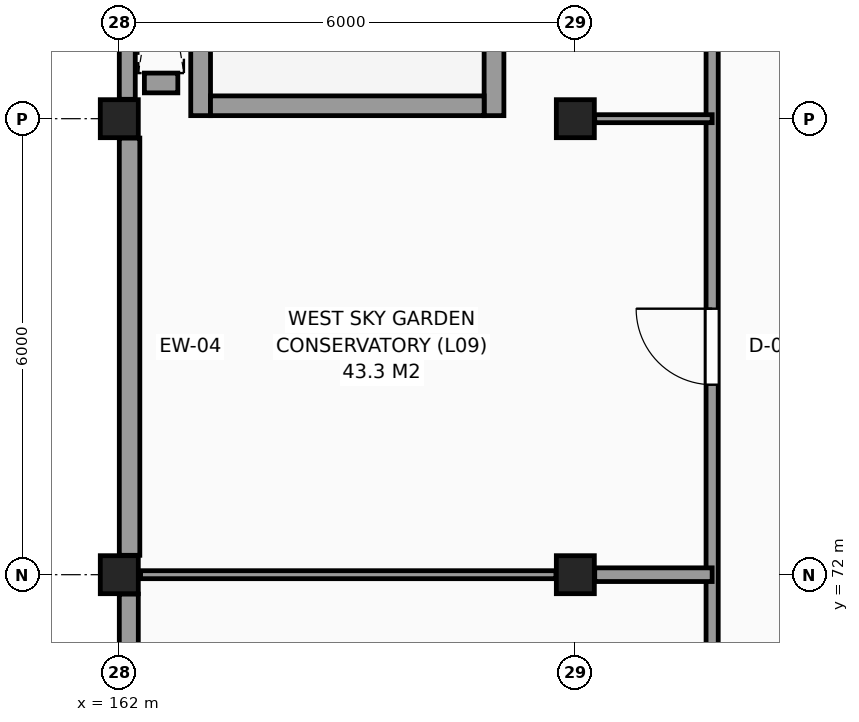
"""IFC4 building model, lengths in metres.
Left out: names, types, materials, properties, quantities, classifications, styles, units other than length and angle.
Written with IfcOpenShell. Run it as: python <this file> out.ifc"""

import sys

from ifc_helpers import new_model, si_unit, direction, frame, frame_2d, origin, origin_2d, place, context, subcontext, project, spatial, rectangle, extrude, element, fill, save


model = new_model("IFC4")
c1 = context("Model", 3, precision=1e-05, world=origin(), true_north=direction((0.0, 1.0)))
c2 = subcontext(c1, "Body", "Model", "MODEL_VIEW")
j1 = project(units=[si_unit("LENGTHUNIT", "METRE"), si_unit("PLANEANGLEUNIT", "RADIAN")], contexts=[c1])
p1 = place(None, origin())
s1 = spatial("IfcSite", under=j1, at=p1, CompositionType="ELEMENT")
p2 = place(p1, origin())
s2 = spatial("IfcBuilding", under=s1, at=p2, CompositionType="ELEMENT")
p3 = place(p2, frame((0.0, 0.0, 38.1)))
s3 = spatial("IfcBuildingStorey", under=s2, at=p3, CompositionType="ELEMENT", Elevation=38.1)
for number, where, z_axis, x_axis in (
    (1, (162.0, 72.0, 0.0), (0.0, 0.0, 1.0), (1.0, 0.0, 0.0)),
    (2, (162.0, 78.0, 0.0), (0.0, 0.0, 1.0), (1.0, 0.0, 0.0)),
    (3, (168.0, 72.0, 0.0), (0.0, 0.0, 1.0), (1.0, 0.0, 0.0)),
    (4, (168.0, 78.0, 0.0), (0.0, 0.0, 1.0), (1.0, 0.0, 0.0)),
):
    element("IfcColumn", number, at=place(p3, frame(where, z_axis=z_axis, x_axis=x_axis)), inside=s3, PredefinedType="COLUMN", context=c2, shape_type="SweptSolid", body=[
        extrude(rectangle(XDim=0.5, YDim=0.5, at=origin_2d()), origin(), (0.0, 0.0, 1.0), 3.3),
    ])
p4 = place(p3, frame((162.105, 83.745, 0.0), z_axis=(0.0, 0.0, 1.0), x_axis=(0.0, -1.0, 0.0)))
e5 = element("IfcWall", 5, at=p4, inside=s3, PredefinedType="SOLIDWALL", context=c2, shape_type="SweptSolid", body=[
    extrude(rectangle(XDim=5.49, YDim=0.21, at=frame_2d((2.745, 0.0))), origin(), (0.0, 0.0, 1.0), 3.06),
])
p5 = place(p3, frame((162.135, 77.745, 0.0), z_axis=(0.0, 0.0, 1.0), x_axis=(0.0, -1.0, 0.0)))
e6 = element("IfcWall", 6, at=p5, inside=s3, PredefinedType="SOLIDWALL", context=c2, shape_type="SweptSolid", body=[
    extrude(rectangle(XDim=5.49, YDim=0.27, at=frame_2d((2.745, 0.0))), origin(), (0.0, 0.0, 1.0), 2.41),
])
p6 = place(p3, frame((162.125, 71.745, 0.0), z_axis=(0.0, 0.0, 1.0), x_axis=(0.0, -1.0, 0.0)))
e7 = element("IfcWall", 7, at=p6, inside=s3, PredefinedType="SOLIDWALL", context=c2, shape_type="SweptSolid", body=[
    extrude(rectangle(XDim=5.49, YDim=0.25, at=frame_2d((2.745, 0.0))), origin(), (0.0, 0.0, 1.0), 2.41),
])
p7 = place(p6, frame((2.045, 0.0, 0.8)))
e8 = element("IfcOpeningElement", 8, at=p7, cuts=e7, PredefinedType="OPENING", context=c2, shape_type="SweptSolid", body=[
    extrude(rectangle(XDim=1.4, YDim=1.4, at=frame_2d((0.7, 0.7))), frame((0.0, 0.135, 0.0), z_axis=(0.0, -1.0, 0.0), x_axis=(1.0, 0.0, 0.0)), (0.0, 0.0, 1.0), 0.27),
])
for number, where, z_axis, x_axis in (
    (9, (163.07, 78.04, 0.0), (0.0, 0.0, 1.0), (0.0, 1.0, 0.0)),
    (10, (166.93, 78.04, 0.0), (0.0, 0.0, 1.0), (0.0, 1.0, 0.0)),
):
    element("IfcWall", number, at=place(p3, frame(where, z_axis=z_axis, x_axis=x_axis)), inside=s3, PredefinedType="SHEAR", context=c2, shape_type="SweptSolid", body=[
        extrude(rectangle(XDim=10.72, YDim=0.26, at=frame_2d((5.36, 0.0))), origin(), (0.0, 0.0, 1.0), 3.3),
    ])
p8 = place(p3, frame((163.2, 78.17, 0.0), z_axis=(0.0, 0.0, 1.0), x_axis=(1.0, 0.0, 0.0)))
e11 = element("IfcWall", 11, at=p8, inside=s3, PredefinedType="SHEAR", context=c2, shape_type="SweptSolid", body=[
    extrude(rectangle(XDim=3.6, YDim=0.26, at=frame_2d((1.8, 0.0))), origin(), (0.0, 0.0, 1.0), 3.3),
])
p9 = place(p3, frame((162.33, 78.47, 0.0), z_axis=(0.0, 0.0, 1.0), x_axis=(1.0, 0.0, 0.0)))
e12 = element("IfcWall", 12, at=p9, inside=s3, PredefinedType="SHEAR", context=c2, shape_type="SweptSolid", body=[
    extrude(rectangle(XDim=0.44, YDim=0.26, at=frame_2d((0.22, 0.0))), origin(), (0.0, 0.0, 1.0), 3.3),
])
p10 = place(p3, frame((169.8, 42.215, 0.0), z_axis=(0.0, 0.0, 1.0), x_axis=(0.0, 1.0, 0.0)))
e13 = element("IfcWall", 13, at=p10, inside=s3, PredefinedType="PARTITIONING", context=c2, shape_type="SweptSolid", body=[
    extrude(rectangle(XDim=65.605, YDim=0.16, at=frame_2d((32.802, 0.0))), origin(), (0.0, 0.0, 1.0), 3.06),
])
p11 = place(p10, frame((50.185, 0.0, 0.0)))
e14 = element("IfcOpeningElement", 14, at=p11, cuts=e13, PredefinedType="OPENING", context=c2, shape_type="SweptSolid", body=[
    extrude(rectangle(XDim=1.2, YDim=2.2, at=frame_2d((0.6, 1.1))), frame((0.0, 0.09, 0.0), z_axis=(0.0, -1.0, 0.0), x_axis=(1.0, 0.0, 0.0)), (0.0, 0.0, 1.0), 0.18),
])
p12 = place(p10, frame((32.285, 0.0, 0.0)))
e15 = element("IfcOpeningElement", 15, at=p12, cuts=e13, PredefinedType="OPENING", context=c2, shape_type="SweptSolid", body=[
    extrude(rectangle(XDim=1.0, YDim=2.15, at=frame_2d((0.5, 1.075))), frame((0.0, 0.09, 0.0), z_axis=(0.0, -1.0, 0.0), x_axis=(1.0, 0.0, 0.0)), (0.0, 0.0, 1.0), 0.18),
])
p13 = place(p10, frame((0.46, 0.0, 0.0)))
e16 = element("IfcOpeningElement", 16, at=p13, cuts=e13, PredefinedType="OPENING", context=c2, shape_type="SweptSolid", body=[
    extrude(rectangle(XDim=0.95, YDim=2.1, at=frame_2d((0.475, 1.05))), frame((0.0, 0.09, 0.0), z_axis=(0.0, -1.0, 0.0), x_axis=(1.0, 0.0, 0.0)), (0.0, 0.0, 1.0), 0.18),
])
p14 = place(p10, frame((6.51, 0.0, 0.0)))
e17 = element("IfcOpeningElement", 17, at=p14, cuts=e13, PredefinedType="OPENING", context=c2, shape_type="SweptSolid", body=[
    extrude(rectangle(XDim=0.95, YDim=2.1, at=frame_2d((0.475, 1.05))), frame((0.0, 0.09, 0.0), z_axis=(0.0, -1.0, 0.0), x_axis=(1.0, 0.0, 0.0)), (0.0, 0.0, 1.0), 0.18),
])
p15 = place(p10, frame((12.51, 0.0, 0.0)))
e18 = element("IfcOpeningElement", 18, at=p15, cuts=e13, PredefinedType="OPENING", context=c2, shape_type="SweptSolid", body=[
    extrude(rectangle(XDim=0.95, YDim=2.1, at=frame_2d((0.475, 1.05))), frame((0.0, 0.09, 0.0), z_axis=(0.0, -1.0, 0.0), x_axis=(1.0, 0.0, 0.0)), (0.0, 0.0, 1.0), 0.18),
])
p16 = place(p10, frame((18.51, 0.0, 0.0)))
e19 = element("IfcOpeningElement", 19, at=p16, cuts=e13, PredefinedType="OPENING", context=c2, shape_type="SweptSolid", body=[
    extrude(rectangle(XDim=0.95, YDim=2.1, at=frame_2d((0.475, 1.05))), frame((0.0, 0.09, 0.0), z_axis=(0.0, -1.0, 0.0), x_axis=(1.0, 0.0, 0.0)), (0.0, 0.0, 1.0), 0.18),
])
p17 = place(p10, frame((24.51, 0.0, 0.0)))
e20 = element("IfcOpeningElement", 20, at=p17, cuts=e13, PredefinedType="OPENING", context=c2, shape_type="SweptSolid", body=[
    extrude(rectangle(XDim=0.95, YDim=2.1, at=frame_2d((0.475, 1.05))), frame((0.0, 0.09, 0.0), z_axis=(0.0, -1.0, 0.0), x_axis=(1.0, 0.0, 0.0)), (0.0, 0.0, 1.0), 0.18),
])
p18 = place(p10, frame((54.51, 0.0, 0.0)))
e21 = element("IfcOpeningElement", 21, at=p18, cuts=e13, PredefinedType="OPENING", context=c2, shape_type="SweptSolid", body=[
    extrude(rectangle(XDim=0.95, YDim=2.1, at=frame_2d((0.475, 1.05))), frame((0.0, 0.09, 0.0), z_axis=(0.0, -1.0, 0.0), x_axis=(1.0, 0.0, 0.0)), (0.0, 0.0, 1.0), 0.18),
])
p19 = place(p10, frame((60.51, 0.0, 0.0)))
e22 = element("IfcOpeningElement", 22, at=p19, cuts=e13, PredefinedType="OPENING", context=c2, shape_type="SweptSolid", body=[
    extrude(rectangle(XDim=0.95, YDim=2.1, at=frame_2d((0.475, 1.05))), frame((0.0, 0.09, 0.0), z_axis=(0.0, -1.0, 0.0), x_axis=(1.0, 0.0, 0.0)), (0.0, 0.0, 1.0), 0.18),
])
p20 = place(p3, frame((162.28, 72.0, 0.0), z_axis=(0.0, 0.0, 1.0), x_axis=(1.0, 0.0, 0.0)))
e23 = element("IfcWall", 23, at=p20, inside=s3, PredefinedType="PARTITIONING", context=c2, shape_type="SweptSolid", body=[
    extrude(rectangle(XDim=5.465, YDim=0.105, at=frame_2d((2.732, 0.0))), origin(), (0.0, 0.0, 1.0), 2.26),
])
p21 = place(p3, frame((168.255, 72.0, 0.0), z_axis=(0.0, 0.0, 1.0), x_axis=(1.0, 0.0, 0.0)))
e24 = element("IfcWall", 24, at=p21, inside=s3, PredefinedType="PARTITIONING", context=c2, shape_type="SweptSolid", body=[
    extrude(rectangle(XDim=1.545, YDim=0.18, at=frame_2d((0.772, 0.0))), origin(), (0.0, 0.0, 1.0), 2.26),
])
p22 = place(p3, frame((168.255, 78.0, 0.0), z_axis=(0.0, 0.0, 1.0), x_axis=(1.0, 0.0, 0.0)))
e25 = element("IfcWall", 25, at=p22, inside=s3, PredefinedType="PARTITIONING", context=c2, shape_type="SweptSolid", body=[
    extrude(rectangle(XDim=1.545, YDim=0.105, at=frame_2d((0.772, 0.0))), origin(), (0.0, 0.0, 1.0), 2.26),
])
p23 = place(p12, origin())
e26 = element("IfcDoor", 26, at=p23, inside=s3, OperationType="SINGLE_SWING_RIGHT", PredefinedType="DOOR", context=c2, shape_type="SweptSolid", body=[
    extrude(rectangle(XDim=1.0, YDim=2.15, at=frame_2d((0.5, 1.075))), frame((0.0, 0.025, 0.0), z_axis=(0.0, -1.0, 0.0), x_axis=(1.0, 0.0, 0.0)), (0.0, 0.0, 1.0), 0.05),
])
fill(e15, e26)
save(model, sys.argv[1])
